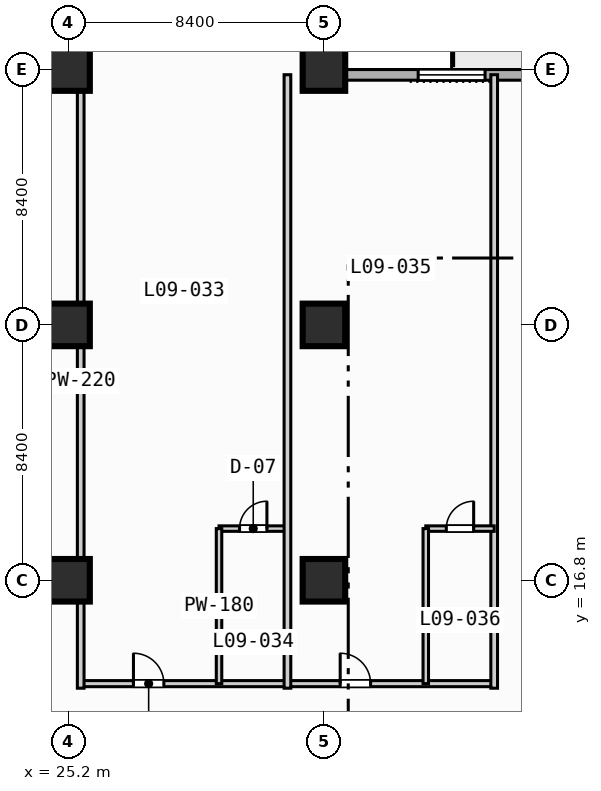
"""IFC4 building model, lengths in metres.
Left out: names, types, materials, properties, quantities, classifications, styles, units other than length and angle.
Written with IfcOpenShell. Run it as: python <this file> out.ifc"""

import sys

from ifc_helpers import new_model, si_unit, direction, frame, frame_2d, origin, origin_2d, place, context, subcontext, project, spatial, rectangle, extrude, element, fill, save


model = new_model("IFC4")
c1 = context("Model", 3, precision=1e-05, world=origin(), true_north=direction((0.0, 1.0)))
c2 = subcontext(c1, "Body", "Model", "MODEL_VIEW")
j1 = project(units=[si_unit("LENGTHUNIT", "METRE"), si_unit("PLANEANGLEUNIT", "RADIAN")], contexts=[c1])
p1 = place(None, origin())
s1 = spatial("IfcSite", under=j1, at=p1, CompositionType="ELEMENT")
p2 = place(p1, origin())
s2 = spatial("IfcBuilding", under=s1, at=p2, CompositionType="ELEMENT")
p3 = place(p2, frame((0.0, 0.0, 43.4)))
s3 = spatial("IfcBuildingStorey", under=s2, at=p3, CompositionType="ELEMENT", Elevation=43.4)
for number, where, z_axis, x_axis in (
    (1, (25.2, 16.8, 0.0), (0.0, 0.0, 1.0), (1.0, 0.0, 0.0)),
    (2, (25.2, 25.2, 0.0), (0.0, 0.0, 1.0), (1.0, 0.0, 0.0)),
    (3, (25.2, 33.6, 0.0), (0.0, 0.0, 1.0), (1.0, 0.0, 0.0)),
    (4, (33.6, 16.8, 0.0), (0.0, 0.0, 1.0), (1.0, 0.0, 0.0)),
    (5, (33.6, 25.2, 0.0), (0.0, 0.0, 1.0), (1.0, 0.0, 0.0)),
    (6, (33.6, 33.6, 0.0), (0.0, 0.0, 1.0), (1.0, 0.0, 0.0)),
):
    element("IfcColumn", number, at=place(p3, frame(where, z_axis=z_axis, x_axis=x_axis)), inside=s3, PredefinedType="COLUMN", context=c2, shape_type="SweptSolid", body=[
        extrude(rectangle(XDim=1.4, YDim=1.4, at=origin_2d()), origin(), (0.0, 0.0, 1.0), 3.8),
    ])
p4 = place(p3, frame((33.425, 89.225, 0.0), z_axis=(0.0, 0.0, 1.0), x_axis=(0.0, -1.0, 0.0)))
e7 = element("IfcWall", 7, at=p4, inside=s3, PredefinedType="STANDARD", context=c2, shape_type="SweptSolid", body=[
    extrude(rectangle(XDim=55.8, YDim=0.35, at=frame_2d((27.9, 0.0))), origin(), (0.0, 0.0, 1.0), 3.55),
])
p5 = place(p4, frame((16.725, 0.0, 0.85)))
e8 = element("IfcOpeningElement", 8, at=p5, cuts=e7, PredefinedType="OPENING", context=c2, shape_type="SweptSolid", body=[
    extrude(rectangle(XDim=2.2, YDim=1.8, at=frame_2d((1.1, 0.9))), frame((0.0, 0.185, 0.0), z_axis=(0.0, -1.0, 0.0), x_axis=(1.0, 0.0, 0.0)), (0.0, 0.0, 1.0), 0.37),
])
p6 = place(p4, frame((8.325, 0.0, 0.85)))
e9 = element("IfcOpeningElement", 9, at=p6, cuts=e7, PredefinedType="OPENING", context=c2, shape_type="SweptSolid", body=[
    extrude(rectangle(XDim=2.2, YDim=1.8, at=frame_2d((1.1, 0.9))), frame((0.0, 0.185, 0.0), z_axis=(0.0, -1.0, 0.0), x_axis=(1.0, 0.0, 0.0)), (0.0, 0.0, 1.0), 0.37),
])
p7 = place(p3, frame((33.425, 33.425, 0.0), z_axis=(0.0, 0.0, 1.0), x_axis=(1.0, 0.0, 0.0)))
e10 = element("IfcWall", 10, at=p7, inside=s3, PredefinedType="STANDARD", context=c2, shape_type="SweptSolid", body=[
    extrude(rectangle(XDim=55.8, YDim=0.35, at=frame_2d((27.9, 0.0))), origin(), (0.0, 0.0, 1.0), 3.55),
])
p8 = place(p7, frame((12.075, 0.0, 0.0)))
e11 = element("IfcOpeningElement", 11, at=p8, cuts=e10, PredefinedType="OPENING", context=c2, shape_type="SweptSolid", body=[
    extrude(rectangle(XDim=1.4, YDim=2.2, at=frame_2d((0.7, 1.1))), frame((0.0, 0.185, 0.0), z_axis=(0.0, -1.0, 0.0), x_axis=(1.0, 0.0, 0.0)), (0.0, 0.0, 1.0), 0.37),
])
p9 = place(p7, frame((3.275, 0.0, 0.85)))
e12 = element("IfcOpeningElement", 12, at=p9, cuts=e10, PredefinedType="OPENING", context=c2, shape_type="SweptSolid", body=[
    extrude(rectangle(XDim=2.2, YDim=1.8, at=frame_2d((1.1, 0.9))), frame((0.0, 0.185, 0.0), z_axis=(0.0, -1.0, 0.0), x_axis=(1.0, 0.0, 0.0)), (0.0, 0.0, 1.0), 0.37),
])
p10 = place(p3, frame((25.6, 13.4, 0.0), z_axis=(0.0, 0.0, 1.0), x_axis=(1.0, 0.0, 0.0)))
e13 = element("IfcWall", 13, at=p10, inside=s3, PredefinedType="PARTITIONING", context=c2, shape_type="SweptSolid", body=[
    extrude(rectangle(XDim=13.6, YDim=0.2, at=frame_2d((6.8, 0.0))), origin(), (0.0, 0.0, 1.0), 3.55),
])
p11 = place(p10, frame((1.735, 0.0, 0.0)))
e14 = element("IfcOpeningElement", 14, at=p11, cuts=e13, PredefinedType="OPENING", context=c2, shape_type="SweptSolid", body=[
    extrude(rectangle(XDim=1.0, YDim=2.15, at=frame_2d((0.5, 1.075))), frame((0.0, 0.11, 0.0), z_axis=(0.0, -1.0, 0.0), x_axis=(1.0, 0.0, 0.0)), (0.0, 0.0, 1.0), 0.22),
])
p12 = place(p10, frame((8.535, 0.0, 0.0)))
e15 = element("IfcOpeningElement", 15, at=p12, cuts=e13, PredefinedType="OPENING", context=c2, shape_type="SweptSolid", body=[
    extrude(rectangle(XDim=1.0, YDim=2.15, at=frame_2d((0.5, 1.075))), frame((0.0, 0.11, 0.0), z_axis=(0.0, -1.0, 0.0), x_axis=(1.0, 0.0, 0.0)), (0.0, 0.0, 1.0), 0.22),
])
p13 = place(p3, frame((25.6, 13.25, 0.0), z_axis=(0.0, 0.0, 1.0), x_axis=(0.0, 1.0, 0.0)))
e16 = element("IfcWall", 16, at=p13, inside=s3, PredefinedType="PARTITIONING", context=c2, shape_type="SweptSolid", body=[
    extrude(rectangle(XDim=20.18, YDim=0.22, at=frame_2d((10.09, 0.0))), origin(), (0.0, 0.0, 1.0), 3.55),
])
p14 = place(p3, frame((30.15, 18.5, 0.0), z_axis=(0.0, 0.0, 1.0), x_axis=(1.0, 0.0, 0.0)))
e17 = element("IfcWall", 17, at=p14, inside=s3, PredefinedType="PLUMBINGWALL", context=c2, shape_type="SweptSolid", body=[
    extrude(rectangle(XDim=2.25, YDim=0.18, at=frame_2d((1.125, 0.0))), origin(), (0.0, 0.0, 1.0), 3.55),
])
p15 = place(p14, frame((0.675, 0.0, 0.0)))
e18 = element("IfcOpeningElement", 18, at=p15, cuts=e17, PredefinedType="OPENING", context=c2, shape_type="SweptSolid", body=[
    extrude(rectangle(XDim=0.9, YDim=2.1, at=frame_2d((0.45, 1.05))), frame((0.0, 0.1, 0.0), z_axis=(0.0, -1.0, 0.0), x_axis=(1.0, 0.0, 0.0)), (0.0, 0.0, 1.0), 0.2),
])
p16 = place(p3, frame((30.15, 13.4, 0.0), z_axis=(0.0, 0.0, 1.0), x_axis=(0.0, 1.0, 0.0)))
e19 = element("IfcWall", 19, at=p16, inside=s3, PredefinedType="PLUMBINGWALL", context=c2, shape_type="SweptSolid", body=[
    extrude(rectangle(XDim=5.1, YDim=0.18, at=frame_2d((2.55, 0.0))), origin(), (0.0, 0.0, 1.0), 3.55),
])
for number, where, z_axis, x_axis in (
    (20, (32.4, 13.25, 0.0), (0.0, 0.0, 1.0), (0.0, 1.0, 0.0)),
    (21, (39.2, 13.25, 0.0), (0.0, 0.0, 1.0), (0.0, 1.0, 0.0)),
):
    element("IfcWall", number, at=place(p3, frame(where, z_axis=z_axis, x_axis=x_axis)), inside=s3, PredefinedType="PARTITIONING", context=c2, shape_type="SweptSolid", body=[
        extrude(rectangle(XDim=20.18, YDim=0.22, at=frame_2d((10.09, 0.0))), origin(), (0.0, 0.0, 1.0), 3.55),
    ])
p17 = place(p3, frame((36.95, 18.5, 0.0), z_axis=(0.0, 0.0, 1.0), x_axis=(1.0, 0.0, 0.0)))
e22 = element("IfcWall", 22, at=p17, inside=s3, PredefinedType="PLUMBINGWALL", context=c2, shape_type="SweptSolid", body=[
    extrude(rectangle(XDim=2.25, YDim=0.18, at=frame_2d((1.125, 0.0))), origin(), (0.0, 0.0, 1.0), 3.55),
])
p18 = place(p17, frame((0.675, 0.0, 0.0)))
e23 = element("IfcOpeningElement", 23, at=p18, cuts=e22, PredefinedType="OPENING", context=c2, shape_type="SweptSolid", body=[
    extrude(rectangle(XDim=0.9, YDim=2.1, at=frame_2d((0.45, 1.05))), frame((0.0, 0.1, 0.0), z_axis=(0.0, -1.0, 0.0), x_axis=(1.0, 0.0, 0.0)), (0.0, 0.0, 1.0), 0.2),
])
p19 = place(p3, frame((36.95, 13.4, 0.0), z_axis=(0.0, 0.0, 1.0), x_axis=(0.0, 1.0, 0.0)))
e24 = element("IfcWall", 24, at=p19, inside=s3, PredefinedType="PLUMBINGWALL", context=c2, shape_type="SweptSolid", body=[
    extrude(rectangle(XDim=5.1, YDim=0.18, at=frame_2d((2.55, 0.0))), origin(), (0.0, 0.0, 1.0), 3.55),
])
p20 = place(p9, origin())
e25 = element("IfcWindow", 25, at=p20, inside=s3, PartitioningType="SINGLE_PANEL", PredefinedType="WINDOW", context=c2, shape_type="SweptSolid", body=[
    extrude(rectangle(XDim=2.2, YDim=1.8, at=frame_2d((1.1, 0.9))), frame((0.0, 0.03, 0.0), z_axis=(0.0, -1.0, 0.0), x_axis=(1.0, 0.0, 0.0)), (0.0, 0.0, 1.0), 0.06),
])
fill(e12, e25)
p21 = place(p11, origin())
e26 = element("IfcDoor", 26, at=p21, inside=s3, OperationType="SINGLE_SWING_LEFT", PredefinedType="DOOR", context=c2, shape_type="SweptSolid", body=[
    extrude(rectangle(XDim=1.0, YDim=2.15, at=frame_2d((0.5, 1.075))), frame((0.0, 0.025, 0.0), z_axis=(0.0, -1.0, 0.0), x_axis=(1.0, 0.0, 0.0)), (0.0, 0.0, 1.0), 0.05),
])
fill(e14, e26)
p22 = place(p12, origin())
e27 = element("IfcDoor", 27, at=p22, inside=s3, OperationType="SINGLE_SWING_LEFT", PredefinedType="DOOR", context=c2, shape_type="SweptSolid", body=[
    extrude(rectangle(XDim=1.0, YDim=2.15, at=frame_2d((0.5, 1.075))), frame((0.0, 0.025, 0.0), z_axis=(0.0, -1.0, 0.0), x_axis=(1.0, 0.0, 0.0)), (0.0, 0.0, 1.0), 0.05),
])
fill(e15, e27)
p23 = place(p15, origin())
e28 = element("IfcDoor", 28, at=p23, inside=s3, OperationType="SINGLE_SWING_RIGHT", PredefinedType="DOOR", context=c2, shape_type="SweptSolid", body=[
    extrude(rectangle(XDim=0.9, YDim=2.1, at=frame_2d((0.45, 1.05))), frame((0.0, 0.025, 0.0), z_axis=(0.0, -1.0, 0.0), x_axis=(1.0, 0.0, 0.0)), (0.0, 0.0, 1.0), 0.05),
])
fill(e18, e28)
p24 = place(p18, origin())
e29 = element("IfcDoor", 29, at=p24, inside=s3, OperationType="SINGLE_SWING_RIGHT", PredefinedType="DOOR", context=c2, shape_type="SweptSolid", body=[
    extrude(rectangle(XDim=0.9, YDim=2.1, at=frame_2d((0.45, 1.05))), frame((0.0, 0.025, 0.0), z_axis=(0.0, -1.0, 0.0), x_axis=(1.0, 0.0, 0.0)), (0.0, 0.0, 1.0), 0.05),
])
fill(e23, e29)
save(model, sys.argv[1])
